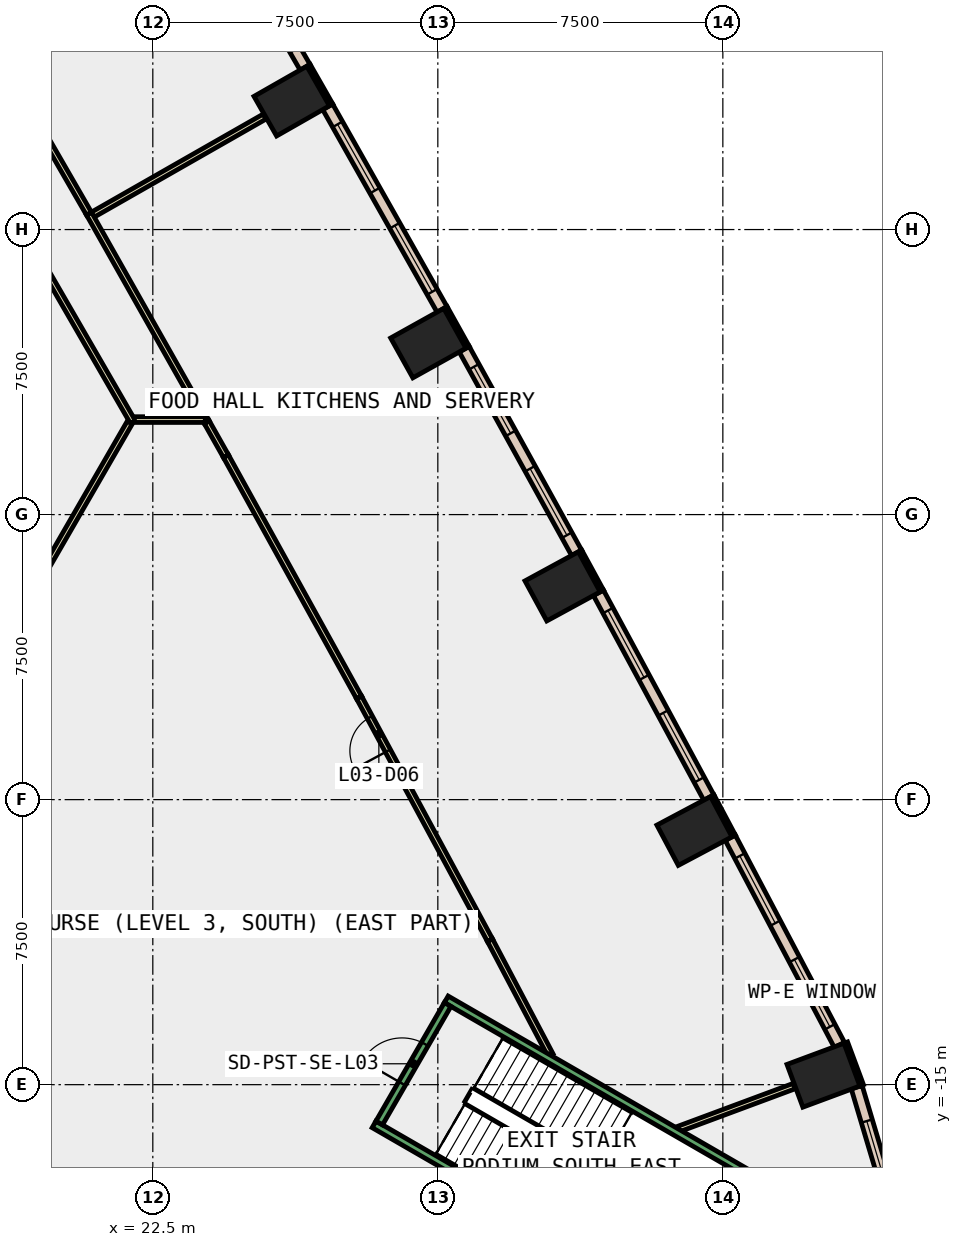
"""IFC4 building model, lengths in metres.
Left out: names, types, materials, properties, quantities, classifications, styles, units other than length and angle.
Written with IfcOpenShell. Run it as: python <this file> out.ifc"""

import sys

from ifc_helpers import new_model, si_unit, direction, frame, frame_2d, origin, origin_2d, place, context, subcontext, project, spatial, rectangle, extrude, element, fill, save


model = new_model("IFC4")
c1 = context("Model", 3, precision=1e-05, world=origin(), true_north=direction((0.0, 1.0)))
c2 = subcontext(c1, "Body", "Model", "MODEL_VIEW")
j1 = project(units=[si_unit("LENGTHUNIT", "METRE"), si_unit("PLANEANGLEUNIT", "RADIAN")], contexts=[c1])
p1 = place(None, origin())
s1 = spatial("IfcSite", under=j1, at=p1, CompositionType="ELEMENT")
p2 = place(p1, origin())
s2 = spatial("IfcBuilding", under=s1, at=p2, CompositionType="ELEMENT")
p3 = place(p2, frame((0.0, 0.0, 20.0)))
s3 = spatial("IfcBuildingStorey", under=s2, at=p3, CompositionType="ELEMENT", Elevation=20.0)
for number, where, z_axis, x_axis in (
    (1, (40.147, -14.751, -0.45), (0.0, 0.0, 1.0), (-0.348, 0.937, 0.0)),
    (2, (36.753, -8.325, -0.45), (0.0, 0.0, 1.0), (-0.469, 0.883, 0.0)),
    (3, (33.283, -1.889, -0.45), (0.0, 0.0, 1.0), (-0.478, 0.878, 0.0)),
    (4, (29.75, 4.512, -0.45), (0.0, 0.0, 1.0), (-0.487, 0.873, 0.0)),
    (5, (26.155, 10.88, -0.45), (0.0, 0.0, 1.0), (-0.496, 0.869, 0.0)),
):
    element("IfcColumn", number, at=place(p3, frame(where, z_axis=z_axis, x_axis=x_axis)), inside=s3, PredefinedType="COLUMN", context=c2, shape_type="SweptSolid", body=[
        extrude(rectangle(XDim=1.2, YDim=1.6, at=origin_2d()), origin(), (0.0, 0.0, 1.0), 5.0),
    ])
p4 = place(p3, frame((41.153, -15.018, 0.0), z_axis=(0.0, 0.0, 1.0), x_axis=(-0.348268249601, 0.937394914814, 0.0)))
e6 = element("IfcWall", 6, at=p4, inside=s3, PredefinedType="STANDARD", context=c2, shape_type="SweptSolid", body=[
    extrude(rectangle(XDim=1.2, YDim=0.1, at=frame_2d((0.6, 0.0))), origin(), (0.0, 0.0, 1.0), 4.55),
])
p5 = place(p3, frame((37.785, -8.456, 0.0), z_axis=(0.0, 0.0, 1.0), x_axis=(-0.469383408131, 0.882994459876, 0.0)))
e7 = element("IfcWall", 7, at=p5, inside=s3, PredefinedType="STANDARD", context=c2, shape_type="SweptSolid", body=[
    extrude(rectangle(XDim=1.199, YDim=0.1, at=frame_2d((0.6, 0.0))), origin(), (0.0, 0.0, 1.0), 4.55),
])
p6 = place(p3, frame((34.316, -2.01, 0.0), z_axis=(0.0, 0.0, 1.0), x_axis=(-0.478267644701, 0.878214131082, 0.0)))
e8 = element("IfcWall", 8, at=p6, inside=s3, PredefinedType="STANDARD", context=c2, shape_type="SweptSolid", body=[
    extrude(rectangle(XDim=1.2, YDim=0.1, at=frame_2d((0.6, 0.0))), origin(), (0.0, 0.0, 1.0), 4.55),
])
p7 = place(p3, frame((30.784, 4.402, 0.0), z_axis=(0.0, 0.0, 1.0), x_axis=(-0.486817526853, 0.873503689488, 0.0)))
e9 = element("IfcWall", 9, at=p7, inside=s3, PredefinedType="STANDARD", context=c2, shape_type="SweptSolid", body=[
    extrude(rectangle(XDim=1.2, YDim=0.1, at=frame_2d((0.6, 0.0))), origin(), (0.0, 0.0, 1.0), 4.55),
])
p8 = place(p3, frame((27.191, 10.78, 0.0), z_axis=(0.0, 0.0, 1.0), x_axis=(-0.495854054996, 0.868405870629, 0.0)))
e10 = element("IfcWall", 10, at=p8, inside=s3, PredefinedType="STANDARD", context=c2, shape_type="SweptSolid", body=[
    extrude(rectangle(XDim=1.2, YDim=0.1, at=frame_2d((0.6, 0.0))), origin(), (0.0, 0.0, 1.0), 4.55),
])
p9 = place(p3, frame((42.011, -18.382, 0.0), z_axis=(0.0, 0.0, 1.0), x_axis=(-0.285800575124, 0.958289116738, 0.0)))
e11 = element("IfcWall", 11, at=p9, inside=s3, PredefinedType="STANDARD", context=c2, shape_type="SweptSolid", body=[
    extrude(rectangle(XDim=3.46, YDim=0.3, at=frame_2d((1.73, 0.0))), origin(), (0.0, 0.0, 1.0), 4.55),
])
p10 = place(p9, frame((0.93, 0.0, 1.0)))
e12 = element("IfcOpeningElement", 12, at=p10, cuts=e11, PredefinedType="OPENING", context=c2, shape_type="SweptSolid", body=[
    extrude(rectangle(XDim=1.6, YDim=3.2, at=frame_2d((0.8, 1.6))), frame((0.0, 0.16, 0.0), z_axis=(0.0, -1.0, 0.0), x_axis=(1.0, 0.0, 0.0)), (0.0, 0.0, 1.0), 0.32),
])
p11 = place(p3, frame((40.568, -13.956, 0.0), z_axis=(0.0, 0.0, 1.0), x_axis=(-0.466125129602, 0.884718804792, 0.0)))
e13 = element("IfcWall", 13, at=p11, inside=s3, PredefinedType="STANDARD", context=c2, shape_type="SweptSolid", body=[
    extrude(rectangle(XDim=6.164, YDim=0.3, at=frame_2d((3.082, 0.0))), origin(), (0.0, 0.0, 1.0), 4.55),
])
p12 = place(p11, frame((0.541, 0.0, 1.0)))
e14 = element("IfcOpeningElement", 14, at=p12, cuts=e13, PredefinedType="OPENING", context=c2, shape_type="SweptSolid", body=[
    extrude(rectangle(XDim=2.0, YDim=3.2, at=frame_2d((1.0, 1.6))), frame((0.0, 0.16, 0.0), z_axis=(0.0, -1.0, 0.0), x_axis=(1.0, 0.0, 0.0)), (0.0, 0.0, 1.0), 0.32),
])
p13 = place(p11, frame((3.623, 0.0, 1.0)))
e15 = element("IfcOpeningElement", 15, at=p13, cuts=e13, PredefinedType="OPENING", context=c2, shape_type="SweptSolid", body=[
    extrude(rectangle(XDim=2.0, YDim=3.2, at=frame_2d((1.0, 1.6))), frame((0.0, 0.16, 0.0), z_axis=(0.0, -1.0, 0.0), x_axis=(1.0, 0.0, 0.0)), (0.0, 0.0, 1.0), 0.32),
])
p14 = place(p3, frame((37.131, -7.446, 0.0), z_axis=(0.0, 0.0, 1.0), x_axis=(-0.474584950749, 0.880209704856, 0.0)))
e16 = element("IfcWall", 16, at=p14, inside=s3, PredefinedType="STANDARD", context=c2, shape_type="SweptSolid", body=[
    extrude(rectangle(XDim=6.121, YDim=0.3, at=frame_2d((3.061, 0.0))), origin(), (0.0, 0.0, 1.0), 4.55),
])
p15 = place(p14, frame((0.53, 0.0, 1.0)))
e17 = element("IfcOpeningElement", 17, at=p15, cuts=e16, PredefinedType="OPENING", context=c2, shape_type="SweptSolid", body=[
    extrude(rectangle(XDim=2.0, YDim=3.2, at=frame_2d((1.0, 1.6))), frame((0.0, 0.16, 0.0), z_axis=(0.0, -1.0, 0.0), x_axis=(1.0, 0.0, 0.0)), (0.0, 0.0, 1.0), 0.32),
])
p16 = place(p14, frame((3.591, 0.0, 1.0)))
e18 = element("IfcOpeningElement", 18, at=p16, cuts=e16, PredefinedType="OPENING", context=c2, shape_type="SweptSolid", body=[
    extrude(rectangle(XDim=2.0, YDim=3.2, at=frame_2d((1.0, 1.6))), frame((0.0, 0.16, 0.0), z_axis=(0.0, -1.0, 0.0), x_axis=(1.0, 0.0, 0.0)), (0.0, 0.0, 1.0), 0.32),
])
p17 = place(p3, frame((33.652, -1.006, 0.0), z_axis=(0.0, 0.0, 1.0), x_axis=(-0.483233380559, 0.875491576152, 0.0)))
e19 = element("IfcWall", 19, at=p17, inside=s3, PredefinedType="STANDARD", context=c2, shape_type="SweptSolid", body=[
    extrude(rectangle(XDim=6.121, YDim=0.3, at=frame_2d((3.061, 0.0))), origin(), (0.0, 0.0, 1.0), 4.55),
])
p18 = place(p17, frame((0.53, 0.0, 1.0)))
e20 = element("IfcOpeningElement", 20, at=p18, cuts=e19, PredefinedType="OPENING", context=c2, shape_type="SweptSolid", body=[
    extrude(rectangle(XDim=2.0, YDim=3.2, at=frame_2d((1.0, 1.6))), frame((0.0, 0.16, 0.0), z_axis=(0.0, -1.0, 0.0), x_axis=(1.0, 0.0, 0.0)), (0.0, 0.0, 1.0), 0.32),
])
p19 = place(p17, frame((3.591, 0.0, 1.0)))
e21 = element("IfcOpeningElement", 21, at=p19, cuts=e19, PredefinedType="OPENING", context=c2, shape_type="SweptSolid", body=[
    extrude(rectangle(XDim=2.0, YDim=3.2, at=frame_2d((1.0, 1.6))), frame((0.0, 0.16, 0.0), z_axis=(0.0, -1.0, 0.0), x_axis=(1.0, 0.0, 0.0)), (0.0, 0.0, 1.0), 0.32),
])
p20 = place(p3, frame((30.111, 5.399, 0.0), z_axis=(0.0, 0.0, 1.0), x_axis=(-0.491661677717, 0.870786308267, 0.0)))
e22 = element("IfcWall", 22, at=p20, inside=s3, PredefinedType="STANDARD", context=c2, shape_type="SweptSolid", body=[
    extrude(rectangle(XDim=6.122, YDim=0.3, at=frame_2d((3.061, 0.0))), origin(), (0.0, 0.0, 1.0), 4.55),
])
p21 = place(p20, frame((0.531, 0.0, 1.0)))
e23 = element("IfcOpeningElement", 23, at=p21, cuts=e22, PredefinedType="OPENING", context=c2, shape_type="SweptSolid", body=[
    extrude(rectangle(XDim=2.0, YDim=3.2, at=frame_2d((1.0, 1.6))), frame((0.0, 0.16, 0.0), z_axis=(0.0, -1.0, 0.0), x_axis=(1.0, 0.0, 0.0)), (0.0, 0.0, 1.0), 0.32),
])
p22 = place(p20, frame((3.592, 0.0, 1.0)))
e24 = element("IfcOpeningElement", 24, at=p22, cuts=e22, PredefinedType="OPENING", context=c2, shape_type="SweptSolid", body=[
    extrude(rectangle(XDim=2.0, YDim=3.2, at=frame_2d((1.0, 1.6))), frame((0.0, 0.16, 0.0), z_axis=(0.0, -1.0, 0.0), x_axis=(1.0, 0.0, 0.0)), (0.0, 0.0, 1.0), 0.32),
])
p23 = place(p3, frame((26.507, 11.77, 0.0), z_axis=(0.0, 0.0, 1.0), x_axis=(-0.499939977436, 0.866060055055, 0.0)))
e25 = element("IfcWall", 25, at=p23, inside=s3, PredefinedType="STANDARD", context=c2, shape_type="SweptSolid", body=[
    extrude(rectangle(XDim=6.121, YDim=0.3, at=frame_2d((3.061, 0.0))), origin(), (0.0, 0.0, 1.0), 4.55),
])
p24 = place(p23, frame((0.53, 0.0, 1.0)))
e26 = element("IfcOpeningElement", 26, at=p24, cuts=e25, PredefinedType="OPENING", context=c2, shape_type="SweptSolid", body=[
    extrude(rectangle(XDim=2.0, YDim=3.2, at=frame_2d((1.0, 1.6))), frame((0.0, 0.16, 0.0), z_axis=(0.0, -1.0, 0.0), x_axis=(1.0, 0.0, 0.0)), (0.0, 0.0, 1.0), 0.32),
])
p25 = place(p23, frame((3.591, 0.0, 1.0)))
e27 = element("IfcOpeningElement", 27, at=p25, cuts=e25, PredefinedType="OPENING", context=c2, shape_type="SweptSolid", body=[
    extrude(rectangle(XDim=2.0, YDim=3.2, at=frame_2d((1.0, 1.6))), frame((0.0, 0.16, 0.0), z_axis=(0.0, -1.0, 0.0), x_axis=(1.0, 0.0, 0.0)), (0.0, 0.0, 1.0), 0.32),
])
p26 = place(p3, frame((20.857, 7.856, 0.0), z_axis=(0.0, 0.0, 1.0), x_axis=(0.868547426395, 0.495606061407, 0.0)))
e28 = element("IfcWall", 28, at=p26, inside=s3, PredefinedType="PARTITIONING", context=c2, shape_type="SweptSolid", body=[
    extrude(rectangle(XDim=5.28, YDim=0.15, at=frame_2d((2.64, 0.0))), origin(), (0.0, 0.0, 1.0), 4.55),
])
p27 = place(p3, frame((39.378, -15.037, 0.0), z_axis=(0.0, 0.0, 1.0), x_axis=(-0.937400028274, -0.348254485961, 0.0)))
e29 = element("IfcWall", 29, at=p27, inside=s3, PredefinedType="PARTITIONING", context=c2, shape_type="SweptSolid", body=[
    extrude(rectangle(XDim=3.247, YDim=0.15, at=frame_2d((1.624, 0.0))), origin(), (0.0, 0.0, 1.0), 4.55),
])
p28 = place(p3, frame((32.965, -14.223, 0.0), z_axis=(0.0, 0.0, 1.0), x_axis=(-0.465955257404, 0.884808283244, 0.0)))
e30 = element("IfcWall", 30, at=p28, inside=s3, PredefinedType="PARTITIONING", context=c2, shape_type="SweptSolid", body=[
    extrude(rectangle(XDim=3.421, YDim=0.15, at=frame_2d((1.71, 0.0))), origin(), (0.0, 0.0, 1.0), 4.55),
])
p29 = place(p3, frame((31.371, -11.196, 0.0), z_axis=(0.0, 0.0, 1.0), x_axis=(-0.474637598335, 0.880181316688, 0.0)))
e31 = element("IfcWall", 31, at=p29, inside=s3, PredefinedType="PARTITIONING", context=c2, shape_type="SweptSolid", body=[
    extrude(rectangle(XDim=7.254, YDim=0.15, at=frame_2d((3.627, 0.0))), origin(), (0.0, 0.0, 1.0), 4.55),
])
p30 = place(p29, frame((5.658, 0.0, 0.0)))
e32 = element("IfcOpeningElement", 32, at=p30, cuts=e31, PredefinedType="OPENING", context=c2, shape_type="SweptSolid", body=[
    extrude(rectangle(XDim=1.0, YDim=2.1, at=frame_2d((0.5, 1.05))), frame((0.0, 0.085, 0.0), z_axis=(0.0, -1.0, 0.0), x_axis=(1.0, 0.0, 0.0)), (0.0, 0.0, 1.0), 0.17),
])
p31 = place(p3, frame((27.928, -4.811, 0.0), z_axis=(0.0, 0.0, 1.0), x_axis=(-0.483177018681, 0.875522683098, 0.0)))
e33 = element("IfcWall", 33, at=p31, inside=s3, PredefinedType="PARTITIONING", context=c2, shape_type="SweptSolid", body=[
    extrude(rectangle(XDim=7.252, YDim=0.15, at=frame_2d((3.626, 0.0))), origin(), (0.0, 0.0, 1.0), 4.55),
])
p32 = place(p3, frame((24.424, 1.538, 0.0), z_axis=(0.0, 0.0, 1.0), x_axis=(-0.49140879319, 0.87092904302, 0.0)))
e34 = element("IfcWall", 34, at=p32, inside=s3, PredefinedType="PARTITIONING", context=c2, shape_type="SweptSolid", body=[
    extrude(rectangle(XDim=1.03, YDim=0.15, at=frame_2d((0.515, 0.0))), origin(), (0.0, 0.0, 1.0), 4.55),
])
p33 = place(p3, frame((23.918, 2.435, 0.0), z_axis=(0.0, 0.0, 1.0), x_axis=(-0.491670219182, 0.870781485546, 0.0)))
e35 = element("IfcWall", 35, at=p33, inside=s3, PredefinedType="PARTITIONING", context=c2, shape_type="SweptSolid", body=[
    extrude(rectangle(XDim=6.299, YDim=0.15, at=frame_2d((3.149, 0.0))), origin(), (0.0, 0.0, 1.0), 4.55),
])
p34 = place(p3, frame((20.82, 7.919, 0.0), z_axis=(0.0, 0.0, 1.0), x_axis=(-0.49986672167, 0.866102338391, 0.0)))
e36 = element("IfcWall", 36, at=p34, inside=s3, PredefinedType="PARTITIONING", context=c2, shape_type="SweptSolid", body=[
    extrude(rectangle(XDim=7.178, YDim=0.15, at=frame_2d((3.589, 0.0))), origin(), (0.0, 0.0, 1.0), 4.55),
])
p35 = place(p3, frame((21.939, 2.5, 0.0), z_axis=(0.0, 0.0, 1.0), x_axis=(-0.499959763273, -0.866048633224, 0.0)))
e37 = element("IfcWall", 37, at=p35, inside=s3, PredefinedType="PARTITIONING", context=c2, shape_type="SweptSolid", body=[
    extrude(rectangle(XDim=12.735, YDim=0.15, at=frame_2d((6.367, 0.0))), origin(), (0.0, 0.0, 1.0), 4.55),
])
p36 = place(p3, frame((11.007, 21.435, 0.0), z_axis=(0.0, 0.0, 1.0), x_axis=(0.499977403953, -0.866038449225, 0.0)))
e38 = element("IfcWall", 38, at=p36, inside=s3, PredefinedType="PARTITIONING", context=c2, shape_type="SweptSolid", body=[
    extrude(rectangle(XDim=21.939, YDim=0.15, at=frame_2d((10.969, 0.0))), origin(), (0.0, 0.0, 1.0), 4.55),
])
p37 = place(p3, frame((22.014, 2.5, 0.0), z_axis=(0.0, 0.0, 1.0), x_axis=(1.0, 0.0, 0.0)))
e39 = element("IfcWall", 39, at=p37, inside=s3, PredefinedType="PARTITIONING", context=c2, shape_type="SweptSolid", body=[
    extrude(rectangle(XDim=1.867, YDim=0.15, at=frame_2d((0.934, 0.0))), origin(), (0.0, 0.0, 1.0), 4.55),
])
for number, where, z_axis, x_axis in (
    (40, (28.322, -16.045, 0.0), (0.0, 0.0, 1.0), (0.866, -0.5, 0.0)),
    (41, (30.222, -12.755, 0.0), (0.0, 0.0, 1.0), (0.866, -0.5, 0.0)),
):
    element("IfcWall", number, at=place(p3, frame(where, z_axis=z_axis, x_axis=x_axis)), inside=s3, PredefinedType="STANDARD", context=c2, shape_type="SweptSolid", body=[
        extrude(rectangle(XDim=9.8, YDim=0.2, at=frame_2d((4.9, 0.0))), origin(), (0.0, 0.0, 1.0), 4.55),
    ])
p38 = place(p3, frame((28.458, -16.009, 0.0), z_axis=(0.0, 0.0, 1.0), x_axis=(0.499982693035, 0.866035395735, 0.0)))
e42 = element("IfcWall", 42, at=p38, inside=s3, PredefinedType="STANDARD", context=c2, shape_type="SweptSolid", body=[
    extrude(rectangle(XDim=3.6, YDim=0.2, at=frame_2d((1.8, 0.0))), origin(), (0.0, 0.0, 1.0), 4.55),
])
p39 = place(p38, frame((1.2, 0.0, 0.0)))
e43 = element("IfcOpeningElement", 43, at=p39, cuts=e42, PredefinedType="OPENING", context=c2, shape_type="SweptSolid", body=[
    extrude(rectangle(XDim=1.2, YDim=2.2, at=frame_2d((0.6, 1.1))), frame((0.0, 0.11, 0.0), z_axis=(0.0, -1.0, 0.0), x_axis=(1.0, 0.0, 0.0)), (0.0, 0.0, 1.0), 0.22),
])
p40 = place(p10, origin())
e44 = element("IfcWindow", 44, at=p40, inside=s3, PartitioningType="SINGLE_PANEL", PredefinedType="WINDOW", context=c2, shape_type="SweptSolid", body=[
    extrude(rectangle(XDim=1.6, YDim=3.2, at=frame_2d((0.8, 1.6))), frame((0.0, 0.03, 0.0), z_axis=(0.0, -1.0, 0.0), x_axis=(1.0, 0.0, 0.0)), (0.0, 0.0, 1.0), 0.06),
])
fill(e12, e44)
p41 = place(p12, origin())
e45 = element("IfcWindow", 45, at=p41, inside=s3, PartitioningType="SINGLE_PANEL", PredefinedType="WINDOW", context=c2, shape_type="SweptSolid", body=[
    extrude(rectangle(XDim=2.0, YDim=3.2, at=frame_2d((1.0, 1.6))), frame((0.0, 0.03, 0.0), z_axis=(0.0, -1.0, 0.0), x_axis=(1.0, 0.0, 0.0)), (0.0, 0.0, 1.0), 0.06),
])
fill(e14, e45)
p42 = place(p13, origin())
e46 = element("IfcWindow", 46, at=p42, inside=s3, PartitioningType="SINGLE_PANEL", PredefinedType="WINDOW", context=c2, shape_type="SweptSolid", body=[
    extrude(rectangle(XDim=2.0, YDim=3.2, at=frame_2d((1.0, 1.6))), frame((0.0, 0.03, 0.0), z_axis=(0.0, -1.0, 0.0), x_axis=(1.0, 0.0, 0.0)), (0.0, 0.0, 1.0), 0.06),
])
fill(e15, e46)
p43 = place(p15, origin())
e47 = element("IfcWindow", 47, at=p43, inside=s3, PartitioningType="SINGLE_PANEL", PredefinedType="WINDOW", context=c2, shape_type="SweptSolid", body=[
    extrude(rectangle(XDim=2.0, YDim=3.2, at=frame_2d((1.0, 1.6))), frame((0.0, 0.03, 0.0), z_axis=(0.0, -1.0, 0.0), x_axis=(1.0, 0.0, 0.0)), (0.0, 0.0, 1.0), 0.06),
])
fill(e17, e47)
p44 = place(p16, origin())
e48 = element("IfcWindow", 48, at=p44, inside=s3, PartitioningType="SINGLE_PANEL", PredefinedType="WINDOW", context=c2, shape_type="SweptSolid", body=[
    extrude(rectangle(XDim=2.0, YDim=3.2, at=frame_2d((1.0, 1.6))), frame((0.0, 0.03, 0.0), z_axis=(0.0, -1.0, 0.0), x_axis=(1.0, 0.0, 0.0)), (0.0, 0.0, 1.0), 0.06),
])
fill(e18, e48)
p45 = place(p18, origin())
e49 = element("IfcWindow", 49, at=p45, inside=s3, PartitioningType="SINGLE_PANEL", PredefinedType="WINDOW", context=c2, shape_type="SweptSolid", body=[
    extrude(rectangle(XDim=2.0, YDim=3.2, at=frame_2d((1.0, 1.6))), frame((0.0, 0.03, 0.0), z_axis=(0.0, -1.0, 0.0), x_axis=(1.0, 0.0, 0.0)), (0.0, 0.0, 1.0), 0.06),
])
fill(e20, e49)
p46 = place(p19, origin())
e50 = element("IfcWindow", 50, at=p46, inside=s3, PartitioningType="SINGLE_PANEL", PredefinedType="WINDOW", context=c2, shape_type="SweptSolid", body=[
    extrude(rectangle(XDim=2.0, YDim=3.2, at=frame_2d((1.0, 1.6))), frame((0.0, 0.03, 0.0), z_axis=(0.0, -1.0, 0.0), x_axis=(1.0, 0.0, 0.0)), (0.0, 0.0, 1.0), 0.06),
])
fill(e21, e50)
p47 = place(p21, origin())
e51 = element("IfcWindow", 51, at=p47, inside=s3, PartitioningType="SINGLE_PANEL", PredefinedType="WINDOW", context=c2, shape_type="SweptSolid", body=[
    extrude(rectangle(XDim=2.0, YDim=3.2, at=frame_2d((1.0, 1.6))), frame((0.0, 0.03, 0.0), z_axis=(0.0, -1.0, 0.0), x_axis=(1.0, 0.0, 0.0)), (0.0, 0.0, 1.0), 0.06),
])
fill(e23, e51)
p48 = place(p22, origin())
e52 = element("IfcWindow", 52, at=p48, inside=s3, PartitioningType="SINGLE_PANEL", PredefinedType="WINDOW", context=c2, shape_type="SweptSolid", body=[
    extrude(rectangle(XDim=2.0, YDim=3.2, at=frame_2d((1.0, 1.6))), frame((0.0, 0.03, 0.0), z_axis=(0.0, -1.0, 0.0), x_axis=(1.0, 0.0, 0.0)), (0.0, 0.0, 1.0), 0.06),
])
fill(e24, e52)
p49 = place(p30, origin())
e53 = element("IfcDoor", 53, at=p49, inside=s3, OperationType="SINGLE_SWING_LEFT", PredefinedType="DOOR", context=c2, shape_type="SweptSolid", body=[
    extrude(rectangle(XDim=1.0, YDim=2.1, at=frame_2d((0.5, 1.05))), frame((0.0, 0.025, 0.0), z_axis=(0.0, -1.0, 0.0), x_axis=(1.0, 0.0, 0.0)), (0.0, 0.0, 1.0), 0.05),
])
fill(e32, e53)
p50 = place(p39, origin())
e54 = element("IfcDoor", 54, at=p50, inside=s3, OperationType="SINGLE_SWING_LEFT", PredefinedType="DOOR", context=c2, shape_type="SweptSolid", body=[
    extrude(rectangle(XDim=1.2, YDim=2.2, at=frame_2d((0.6, 1.1))), frame((0.0, 0.025, 0.0), z_axis=(0.0, -1.0, 0.0), x_axis=(1.0, 0.0, 0.0)), (0.0, 0.0, 1.0), 0.05),
])
fill(e43, e54)
save(model, sys.argv[1])
